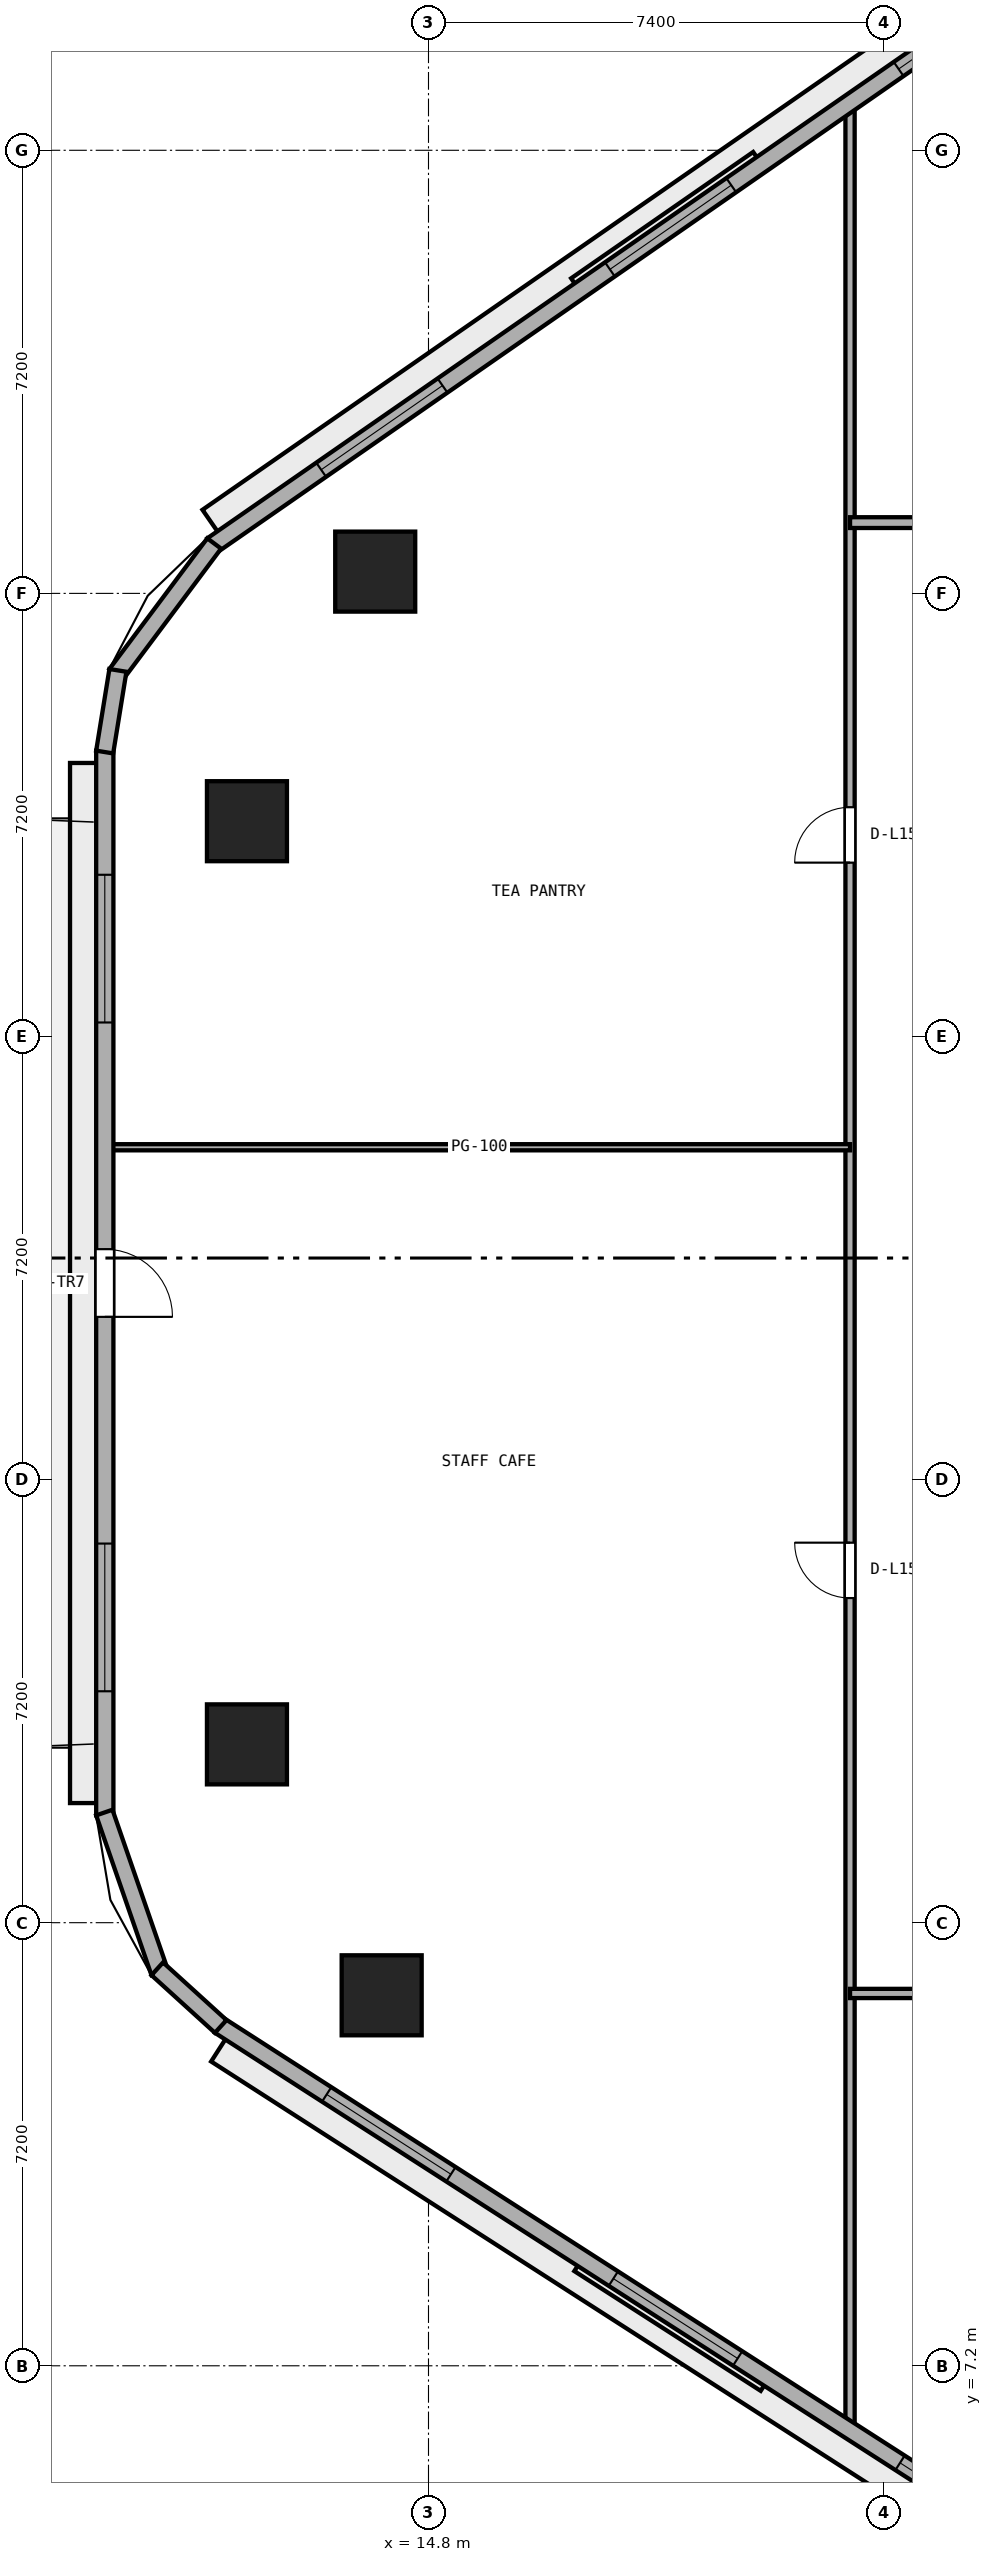
"""IFC4 building model, lengths in metres.
Left out: names, types, materials, properties, quantities, classifications, styles, units other than length and angle.
Written with IfcOpenShell. Run it as: python <this file> out.ifc"""

import sys

from ifc_helpers import new_model, si_unit, direction, frame, frame_2d, origin, origin_2d, place, context, subcontext, project, spatial, rectangle, extrude, element, fill, save


model = new_model("IFC4")
c1 = context("Model", 3, precision=1e-05, world=origin(), true_north=direction((0.0, 1.0)))
c2 = subcontext(c1, "Body", "Model", "MODEL_VIEW")
j1 = project(units=[si_unit("LENGTHUNIT", "METRE"), si_unit("PLANEANGLEUNIT", "RADIAN")], contexts=[c1])
p1 = place(None, origin())
s1 = spatial("IfcSite", under=j1, at=p1, CompositionType="ELEMENT")
p2 = place(p1, origin())
s2 = spatial("IfcBuilding", under=s1, at=p2, CompositionType="ELEMENT")
p3 = place(p2, frame((0.0, 0.0, 63.0)))
s3 = spatial("IfcBuildingStorey", under=s2, at=p3, CompositionType="ELEMENT", Elevation=63.0)
for number, where, z_axis, x_axis in (
    (1, (13.934, 36.354, 0.0), (0.0, 0.0, 1.0), (1.0, 0.0, 0.0)),
    (2, (11.85, 32.298, 0.0), (0.0, 0.0, 1.0), (1.0, 0.0, 0.0)),
    (3, (11.85, 17.298, 0.0), (0.0, 0.0, 1.0), (1.0, 0.0, 0.0)),
    (4, (14.039, 13.22, 0.0), (0.0, 0.0, 1.0), (1.0, 0.0, 0.0)),
):
    element("IfcColumn", number, at=place(p3, frame(where, z_axis=z_axis, x_axis=x_axis)), inside=s3, PredefinedType="COLUMN", context=c2, shape_type="SweptSolid", body=[
        extrude(rectangle(XDim=1.3, YDim=1.3, at=origin_2d()), origin(), (0.0, 0.0, 1.0), 3.8),
    ])
p4 = place(p3, frame((21.65, 6.119, 0.0), z_axis=(0.0, 0.0, 1.0), x_axis=(0.0, 1.0, 0.0)))
e5 = element("IfcWall", 5, at=p4, inside=s3, PredefinedType="PARTITIONING", context=c2, shape_type="SweptSolid", body=[
    extrude(rectangle(XDim=37.884, YDim=0.15, at=frame_2d((18.942, 0.0))), origin(), (0.0, 0.0, 1.0), 3.525),
])
p5 = place(p4, frame((13.556, 0.0, 0.0)))
e6 = element("IfcOpeningElement", 6, at=p5, cuts=e5, PredefinedType="OPENING", context=c2, shape_type="SweptSolid", body=[
    extrude(rectangle(XDim=0.9, YDim=2.1, at=frame_2d((0.45, 1.05))), frame((0.0, 0.085, 0.0), z_axis=(0.0, -1.0, 0.0), x_axis=(1.0, 0.0, 0.0)), (0.0, 0.0, 1.0), 0.17),
])
p6 = place(p4, frame((25.506, 0.0, 0.0)))
e7 = element("IfcOpeningElement", 7, at=p6, cuts=e5, PredefinedType="OPENING", context=c2, shape_type="SweptSolid", body=[
    extrude(rectangle(XDim=0.9, YDim=2.1, at=frame_2d((0.45, 1.05))), frame((0.0, 0.085, 0.0), z_axis=(0.0, -1.0, 0.0), x_axis=(1.0, 0.0, 0.0)), (0.0, 0.0, 1.0), 0.17),
])
p7 = place(p3, frame((21.65, 13.25, 0.0), z_axis=(0.0, 0.0, 1.0), x_axis=(1.0, 0.0, 0.0)))
e8 = element("IfcWall", 8, at=p7, inside=s3, PredefinedType="PARTITIONING", context=c2, shape_type="SweptSolid", body=[
    extrude(rectangle(XDim=30.7, YDim=0.15, at=frame_2d((15.35, 0.0))), origin(), (0.0, 0.0, 1.0), 3.525),
])
p8 = place(p7, frame((3.695, 0.0, 0.0)))
e9 = element("IfcOpeningElement", 9, at=p8, cuts=e8, PredefinedType="OPENING", context=c2, shape_type="SweptSolid", body=[
    extrude(rectangle(XDim=0.9, YDim=2.1, at=frame_2d((0.45, 1.05))), frame((0.0, 0.085, 0.0), z_axis=(0.0, -1.0, 0.0), x_axis=(1.0, 0.0, 0.0)), (0.0, 0.0, 1.0), 0.17),
])
p9 = place(p7, frame((11.95, 0.0, 0.0)))
e10 = element("IfcOpeningElement", 10, at=p9, cuts=e8, PredefinedType="OPENING", context=c2, shape_type="SweptSolid", body=[
    extrude(rectangle(XDim=0.9, YDim=2.1, at=frame_2d((0.45, 1.05))), frame((0.0, 0.085, 0.0), z_axis=(0.0, -1.0, 0.0), x_axis=(1.0, 0.0, 0.0)), (0.0, 0.0, 1.0), 0.17),
])
p10 = place(p7, frame((20.45, 0.0, 0.0)))
e11 = element("IfcOpeningElement", 11, at=p10, cuts=e8, PredefinedType="OPENING", context=c2, shape_type="SweptSolid", body=[
    extrude(rectangle(XDim=0.9, YDim=2.1, at=frame_2d((0.45, 1.05))), frame((0.0, 0.085, 0.0), z_axis=(0.0, -1.0, 0.0), x_axis=(1.0, 0.0, 0.0)), (0.0, 0.0, 1.0), 0.17),
])
p11 = place(p7, frame((27.305, 0.0, 0.0)))
e12 = element("IfcOpeningElement", 12, at=p11, cuts=e8, PredefinedType="OPENING", context=c2, shape_type="SweptSolid", body=[
    extrude(rectangle(XDim=0.9, YDim=2.1, at=frame_2d((0.45, 1.05))), frame((0.0, 0.085, 0.0), z_axis=(0.0, -1.0, 0.0), x_axis=(1.0, 0.0, 0.0)), (0.0, 0.0, 1.0), 0.17),
])
p12 = place(p3, frame((9.605, 27.0, 0.0), z_axis=(0.0, 0.0, 1.0), x_axis=(1.0, 0.0, 0.0)))
e13 = element("IfcWall", 13, at=p12, inside=s3, PredefinedType="PARTITIONING", context=c2, shape_type="SweptSolid", body=[
    extrude(rectangle(XDim=12.045, YDim=0.1, at=frame_2d((6.022, 0.0))), origin(), (0.0, 0.0, 1.0), 3.525),
])
p13 = place(p3, frame((21.65, 37.15, 0.0), z_axis=(0.0, 0.0, 1.0), x_axis=(1.0, 0.0, 0.0)))
e14 = element("IfcWall", 14, at=p13, inside=s3, PredefinedType="PARTITIONING", context=c2, shape_type="SweptSolid", body=[
    extrude(rectangle(XDim=30.7, YDim=0.175, at=frame_2d((15.35, 0.0))), origin(), (0.0, 0.0, 1.0), 3.525),
])
p14 = place(p13, frame((3.795, 0.0, 0.0)))
e15 = element("IfcOpeningElement", 15, at=p14, cuts=e14, PredefinedType="OPENING", context=c2, shape_type="SweptSolid", body=[
    extrude(rectangle(XDim=1.0, YDim=2.12, at=frame_2d((0.5, 1.06))), frame((0.0, 0.097, 0.0), z_axis=(0.0, -1.0, 0.0), x_axis=(1.0, 0.0, 0.0)), (0.0, 0.0, 1.0), 0.195),
])
p15 = place(p13, frame((18.905, 0.0, 0.0)))
e16 = element("IfcOpeningElement", 16, at=p15, cuts=e14, PredefinedType="OPENING", context=c2, shape_type="SweptSolid", body=[
    extrude(rectangle(XDim=1.0, YDim=2.12, at=frame_2d((0.5, 1.06))), frame((0.0, 0.097, 0.0), z_axis=(0.0, -1.0, 0.0), x_axis=(1.0, 0.0, 0.0)), (0.0, 0.0, 1.0), 0.195),
])
p16 = place(p3, frame((26.182, 47.118, 0.0), z_axis=(0.0, 0.0, 1.0), x_axis=(-0.821547956627, -0.570139417127, 0.0)))
e17 = element("IfcWall", 17, at=p16, inside=s3, PredefinedType="STANDARD", context=c2, shape_type="SweptSolid", body=[
    extrude(rectangle(XDim=18.132, YDim=0.28, at=frame_2d((9.066, 0.0))), origin(), (0.0, 0.0, 1.0), 3.525),
])
p17 = place(p16, frame((2.156, 0.0, 0.9)))
e18 = element("IfcOpeningElement", 18, at=p17, cuts=e17, PredefinedType="OPENING", context=c2, shape_type="SweptSolid", body=[
    extrude(rectangle(XDim=2.4, YDim=1.75, at=frame_2d((1.2, 0.875))), frame((0.0, 0.15, 0.0), z_axis=(0.0, -1.0, 0.0), x_axis=(1.0, 0.0, 0.0)), (0.0, 0.0, 1.0), 0.3),
])
p18 = place(p16, frame((7.866, 0.0, 0.9)))
e19 = element("IfcOpeningElement", 19, at=p18, cuts=e17, PredefinedType="OPENING", context=c2, shape_type="SweptSolid", body=[
    extrude(rectangle(XDim=2.4, YDim=1.75, at=frame_2d((1.2, 0.875))), frame((0.0, 0.15, 0.0), z_axis=(0.0, -1.0, 0.0), x_axis=(1.0, 0.0, 0.0)), (0.0, 0.0, 1.0), 0.3),
])
p19 = place(p16, frame((13.577, 0.0, 0.9)))
e20 = element("IfcOpeningElement", 20, at=p19, cuts=e17, PredefinedType="OPENING", context=c2, shape_type="SweptSolid", body=[
    extrude(rectangle(XDim=2.4, YDim=1.75, at=frame_2d((1.2, 0.875))), frame((0.0, 0.15, 0.0), z_axis=(0.0, -1.0, 0.0), x_axis=(1.0, 0.0, 0.0)), (0.0, 0.0, 1.0), 0.3),
])
p20 = place(p3, frame((9.54, 33.444, 0.0), z_axis=(0.0, 0.0, 1.0), x_axis=(0.0, -1.0, 0.0)))
e21 = element("IfcWall", 21, at=p20, inside=s3, PredefinedType="STANDARD", context=c2, shape_type="SweptSolid", body=[
    extrude(rectangle(XDim=17.301, YDim=0.28, at=frame_2d((8.65, 0.0))), origin(), (0.0, 0.0, 1.0), 3.525),
])
p21 = place(p20, frame((8.1, 0.0, 0.0)))
e22 = element("IfcOpeningElement", 22, at=p21, cuts=e21, PredefinedType="OPENING", context=c2, shape_type="SweptSolid", body=[
    extrude(rectangle(XDim=1.1, YDim=2.2, at=frame_2d((0.55, 1.1))), frame((0.0, 0.15, 0.0), z_axis=(0.0, -1.0, 0.0), x_axis=(1.0, 0.0, 0.0)), (0.0, 0.0, 1.0), 0.3),
])
p22 = place(p20, frame((2.017, 0.0, 0.9)))
e23 = element("IfcOpeningElement", 23, at=p22, cuts=e21, PredefinedType="OPENING", context=c2, shape_type="SweptSolid", body=[
    extrude(rectangle(XDim=2.4, YDim=1.75, at=frame_2d((1.2, 0.875))), frame((0.0, 0.15, 0.0), z_axis=(0.0, -1.0, 0.0), x_axis=(1.0, 0.0, 0.0)), (0.0, 0.0, 1.0), 0.3),
])
p23 = place(p20, frame((12.884, 0.0, 0.9)))
e24 = element("IfcOpeningElement", 24, at=p23, cuts=e21, PredefinedType="OPENING", context=c2, shape_type="SweptSolid", body=[
    extrude(rectangle(XDim=2.4, YDim=1.75, at=frame_2d((1.2, 0.875))), frame((0.0, 0.15, 0.0), z_axis=(0.0, -1.0, 0.0), x_axis=(1.0, 0.0, 0.0)), (0.0, 0.0, 1.0), 0.3),
])
p24 = place(p3, frame((11.405, 12.728, 0.0), z_axis=(0.0, 0.0, 1.0), x_axis=(0.841304564637, -0.540561402175, 0.0)))
e25 = element("IfcWall", 25, at=p24, inside=s3, PredefinedType="STANDARD", context=c2, shape_type="SweptSolid", body=[
    extrude(rectangle(XDim=17.612, YDim=0.28, at=frame_2d((8.806, 0.0))), origin(), (0.0, 0.0, 1.0), 3.525),
])
p25 = place(p24, frame((2.069, 0.0, 0.9)))
e26 = element("IfcOpeningElement", 26, at=p25, cuts=e25, PredefinedType="OPENING", context=c2, shape_type="SweptSolid", body=[
    extrude(rectangle(XDim=2.4, YDim=1.75, at=frame_2d((1.2, 0.875))), frame((0.0, 0.15, 0.0), z_axis=(0.0, -1.0, 0.0), x_axis=(1.0, 0.0, 0.0)), (0.0, 0.0, 1.0), 0.3),
])
p26 = place(p24, frame((7.606, 0.0, 0.9)))
e27 = element("IfcOpeningElement", 27, at=p26, cuts=e25, PredefinedType="OPENING", context=c2, shape_type="SweptSolid", body=[
    extrude(rectangle(XDim=2.4, YDim=1.75, at=frame_2d((1.2, 0.875))), frame((0.0, 0.15, 0.0), z_axis=(0.0, -1.0, 0.0), x_axis=(1.0, 0.0, 0.0)), (0.0, 0.0, 1.0), 0.3),
])
p27 = place(p24, frame((13.143, 0.0, 0.9)))
e28 = element("IfcOpeningElement", 28, at=p27, cuts=e25, PredefinedType="OPENING", context=c2, shape_type="SweptSolid", body=[
    extrude(rectangle(XDim=2.4, YDim=1.75, at=frame_2d((1.2, 0.875))), frame((0.0, 0.15, 0.0), z_axis=(0.0, -1.0, 0.0), x_axis=(1.0, 0.0, 0.0)), (0.0, 0.0, 1.0), 0.3),
])
p28 = place(p3, frame((11.318, 36.811, 0.0), z_axis=(0.0, 0.0, 1.0), x_axis=(-0.599455152629, -0.800408345775, 0.0)))
e29 = element("IfcWall", 29, at=p28, inside=s3, PredefinedType="STANDARD", context=c2, shape_type="SweptSolid", body=[
    extrude(rectangle(XDim=2.653, YDim=0.28, at=frame_2d((1.327, 0.0))), origin(), (0.0, 0.0, 1.0), 3.525),
])
p29 = place(p3, frame((9.753, 34.749, 0.0), z_axis=(0.0, 0.0, 1.0), x_axis=(-0.160037671962, -0.987110907423, 0.0)))
e30 = element("IfcWall", 30, at=p29, inside=s3, PredefinedType="STANDARD", context=c2, shape_type="SweptSolid", body=[
    extrude(rectangle(XDim=1.344, YDim=0.28, at=frame_2d((0.672, 0.0))), origin(), (0.0, 0.0, 1.0), 3.525),
])
p30 = place(p3, frame((9.532, 16.189, 0.0), z_axis=(0.0, 0.0, 1.0), x_axis=(0.32708309668, -0.944995580871, 0.0)))
e31 = element("IfcWall", 31, at=p30, inside=s3, PredefinedType="STANDARD", context=c2, shape_type="SweptSolid", body=[
    extrude(rectangle(XDim=2.748, YDim=0.28, at=frame_2d((1.374, 0.0))), origin(), (0.0, 0.0, 1.0), 3.525),
])
p31 = place(p3, frame((10.393, 13.651, 0.0), z_axis=(0.0, 0.0, 1.0), x_axis=(0.74003521851, -0.672568119498, 0.0)))
e32 = element("IfcWall", 32, at=p31, inside=s3, PredefinedType="STANDARD", context=c2, shape_type="SweptSolid", body=[
    extrude(rectangle(XDim=1.393, YDim=0.28, at=frame_2d((0.697, 0.0))), origin(), (0.0, 0.0, 1.0), 3.525),
])
p32 = place(p5, origin())
e33 = element("IfcDoor", 33, at=p32, inside=s3, OperationType="SINGLE_SWING_RIGHT", PredefinedType="DOOR", context=c2, shape_type="SweptSolid", body=[
    extrude(rectangle(XDim=0.9, YDim=2.1, at=frame_2d((0.45, 1.05))), frame((0.0, 0.025, 0.0), z_axis=(0.0, -1.0, 0.0), x_axis=(1.0, 0.0, 0.0)), (0.0, 0.0, 1.0), 0.05),
])
fill(e6, e33)
p33 = place(p6, origin())
e34 = element("IfcDoor", 34, at=p33, inside=s3, OperationType="SINGLE_SWING_LEFT", PredefinedType="DOOR", context=c2, shape_type="SweptSolid", body=[
    extrude(rectangle(XDim=0.9, YDim=2.1, at=frame_2d((0.45, 1.05))), frame((0.0, 0.025, 0.0), z_axis=(0.0, -1.0, 0.0), x_axis=(1.0, 0.0, 0.0)), (0.0, 0.0, 1.0), 0.05),
])
fill(e7, e34)
p34 = place(p17, origin())
e35 = element("IfcWindow", 35, at=p34, inside=s3, PartitioningType="SINGLE_PANEL", PredefinedType="WINDOW", context=c2, shape_type="SweptSolid", body=[
    extrude(rectangle(XDim=2.4, YDim=1.75, at=frame_2d((1.2, 0.875))), frame((0.0, 0.03, 0.0), z_axis=(0.0, -1.0, 0.0), x_axis=(1.0, 0.0, 0.0)), (0.0, 0.0, 1.0), 0.06),
])
fill(e18, e35)
p35 = place(p18, origin())
e36 = element("IfcWindow", 36, at=p35, inside=s3, PartitioningType="SINGLE_PANEL", PredefinedType="WINDOW", context=c2, shape_type="SweptSolid", body=[
    extrude(rectangle(XDim=2.4, YDim=1.75, at=frame_2d((1.2, 0.875))), frame((0.0, 0.03, 0.0), z_axis=(0.0, -1.0, 0.0), x_axis=(1.0, 0.0, 0.0)), (0.0, 0.0, 1.0), 0.06),
])
fill(e19, e36)
p36 = place(p19, origin())
e37 = element("IfcWindow", 37, at=p36, inside=s3, PartitioningType="SINGLE_PANEL", PredefinedType="WINDOW", context=c2, shape_type="SweptSolid", body=[
    extrude(rectangle(XDim=2.4, YDim=1.75, at=frame_2d((1.2, 0.875))), frame((0.0, 0.03, 0.0), z_axis=(0.0, -1.0, 0.0), x_axis=(1.0, 0.0, 0.0)), (0.0, 0.0, 1.0), 0.06),
])
fill(e20, e37)
p37 = place(p21, origin())
e38 = element("IfcDoor", 38, at=p37, inside=s3, OperationType="SINGLE_SWING_RIGHT", PredefinedType="DOOR", context=c2, shape_type="SweptSolid", body=[
    extrude(rectangle(XDim=1.1, YDim=2.2, at=frame_2d((0.55, 1.1))), frame((0.0, 0.025, 0.0), z_axis=(0.0, -1.0, 0.0), x_axis=(1.0, 0.0, 0.0)), (0.0, 0.0, 1.0), 0.05),
])
fill(e22, e38)
p38 = place(p22, origin())
e39 = element("IfcWindow", 39, at=p38, inside=s3, PartitioningType="SINGLE_PANEL", PredefinedType="WINDOW", context=c2, shape_type="SweptSolid", body=[
    extrude(rectangle(XDim=2.4, YDim=1.75, at=frame_2d((1.2, 0.875))), frame((0.0, 0.03, 0.0), z_axis=(0.0, -1.0, 0.0), x_axis=(1.0, 0.0, 0.0)), (0.0, 0.0, 1.0), 0.06),
])
fill(e23, e39)
p39 = place(p23, origin())
e40 = element("IfcWindow", 40, at=p39, inside=s3, PartitioningType="SINGLE_PANEL", PredefinedType="WINDOW", context=c2, shape_type="SweptSolid", body=[
    extrude(rectangle(XDim=2.4, YDim=1.75, at=frame_2d((1.2, 0.875))), frame((0.0, 0.03, 0.0), z_axis=(0.0, -1.0, 0.0), x_axis=(1.0, 0.0, 0.0)), (0.0, 0.0, 1.0), 0.06),
])
fill(e24, e40)
p40 = place(p25, origin())
e41 = element("IfcWindow", 41, at=p40, inside=s3, PartitioningType="SINGLE_PANEL", PredefinedType="WINDOW", context=c2, shape_type="SweptSolid", body=[
    extrude(rectangle(XDim=2.4, YDim=1.75, at=frame_2d((1.2, 0.875))), frame((0.0, 0.03, 0.0), z_axis=(0.0, -1.0, 0.0), x_axis=(1.0, 0.0, 0.0)), (0.0, 0.0, 1.0), 0.06),
])
fill(e26, e41)
p41 = place(p26, origin())
e42 = element("IfcWindow", 42, at=p41, inside=s3, PartitioningType="SINGLE_PANEL", PredefinedType="WINDOW", context=c2, shape_type="SweptSolid", body=[
    extrude(rectangle(XDim=2.4, YDim=1.75, at=frame_2d((1.2, 0.875))), frame((0.0, 0.03, 0.0), z_axis=(0.0, -1.0, 0.0), x_axis=(1.0, 0.0, 0.0)), (0.0, 0.0, 1.0), 0.06),
])
fill(e27, e42)
p42 = place(p27, origin())
e43 = element("IfcWindow", 43, at=p42, inside=s3, PartitioningType="SINGLE_PANEL", PredefinedType="WINDOW", context=c2, shape_type="SweptSolid", body=[
    extrude(rectangle(XDim=2.4, YDim=1.75, at=frame_2d((1.2, 0.875))), frame((0.0, 0.03, 0.0), z_axis=(0.0, -1.0, 0.0), x_axis=(1.0, 0.0, 0.0)), (0.0, 0.0, 1.0), 0.06),
])
fill(e28, e43)
save(model, sys.argv[1])
